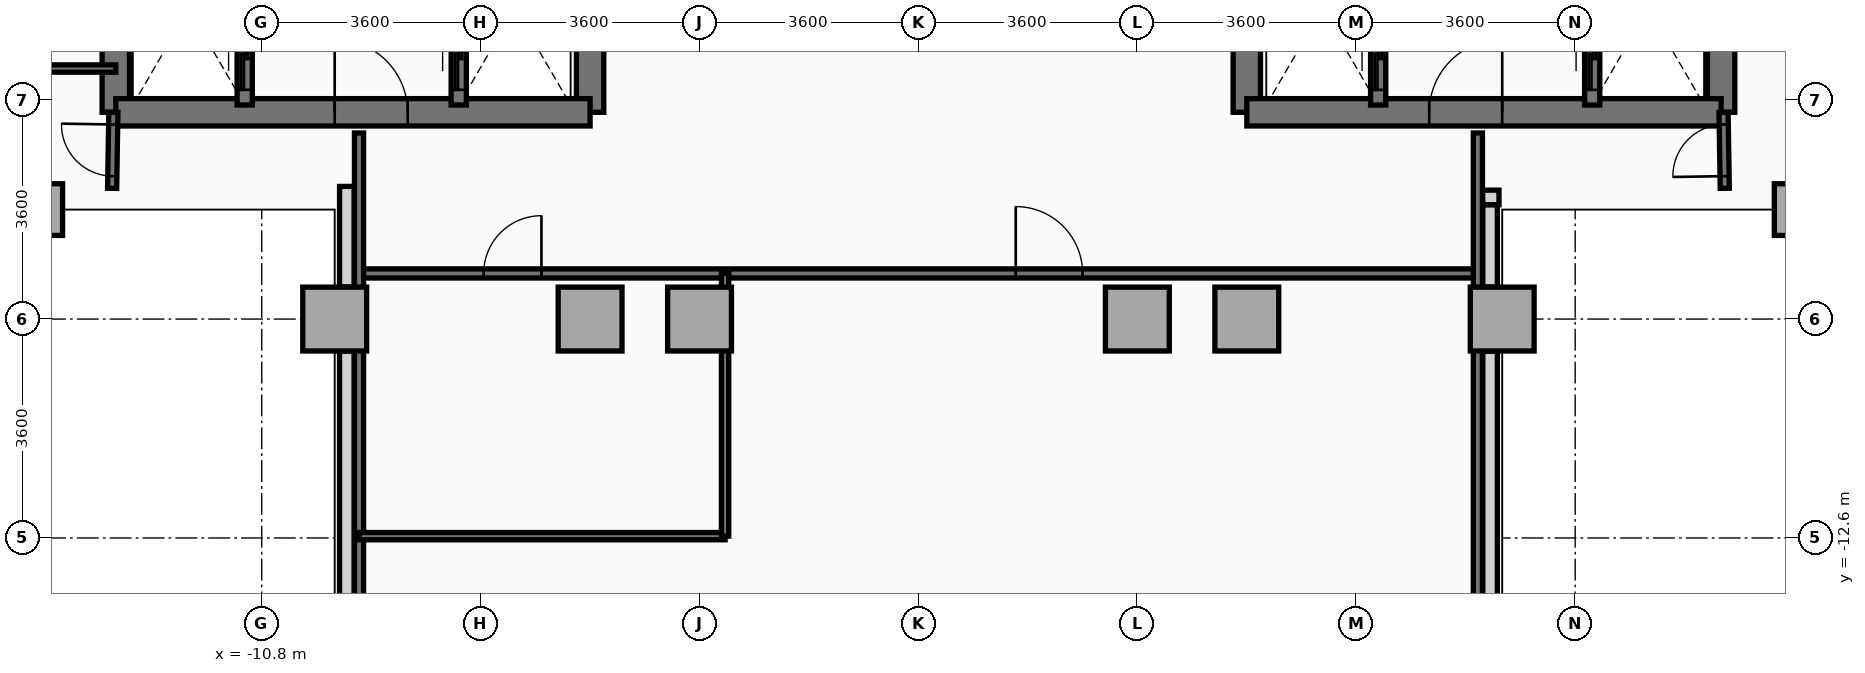
"""IFC4 building model, lengths in metres.
Left out: names, types, materials, properties, quantities, classifications, styles, units other than length and angle.
Written with IfcOpenShell. Run it as: python <this file> out.ifc"""

import sys

from ifc_helpers import new_model, si_unit, direction, frame, frame_2d, origin, origin_2d, place, context, subcontext, project, spatial, rectangle, extrude, source, transform, mapped, element, fill, save


model = new_model("IFC4")
c1 = context("Model", 3, precision=1e-05, world=origin(), true_north=direction((0.0, 1.0)))
c2 = subcontext(c1, "Body", "Model", "MODEL_VIEW")
j1 = project(units=[si_unit("LENGTHUNIT", "METRE"), si_unit("PLANEANGLEUNIT", "RADIAN")], contexts=[c1])
p1 = place(None, origin())
s1 = spatial("IfcSite", under=j1, at=p1, CompositionType="ELEMENT")
p2 = place(p1, origin())
s2 = spatial("IfcBuilding", under=s1, at=p2, CompositionType="ELEMENT")
p3 = place(p2, frame((0.0, 0.0, 93.0)))
s3 = spatial("IfcBuildingStorey", under=s2, at=p3, CompositionType="ELEMENT", Elevation=93.0)
m1 = source(origin(), c2, "Body", "SweptSolid", [
    extrude(rectangle(XDim=0.65, YDim=0.85, at=origin_2d()), origin(), (0.0, 0.0, 1.0), 4.0),
])
p4 = place(p3, frame((-14.4, -7.2, 0.0), z_axis=(0.0, 0.0, 1.0), x_axis=(1.0, 0.0, 0.0)))
e1 = element("IfcColumn", 1, at=p4, inside=s3, PredefinedType="COLUMN", context=c2, shape_type="MappedRepresentation", body=[
    mapped(m1, transform((0.0, 0.0, 0.0), x_axis=(1.0, 0.0, 0.0), y_axis=(0.0, 1.0, 0.0), z_axis=(0.0, 0.0, 1.0), scale=1.0)),
])
m2 = source(origin(), c2, "Body", "SweptSolid", [
    extrude(rectangle(XDim=1.05, YDim=1.05, at=origin_2d()), origin(), (0.0, 0.0, 1.0), 4.0),
])
for number, where, z_axis, x_axis in (
    (2, (-9.6, -9.0, 0.0), (0.0, 0.0, 1.0), (1.0, 0.0, 0.0)),
    (3, (-5.4, -9.0, 0.0), (0.0, 0.0, 1.0), (1.0, 0.0, 0.0)),
    (4, (-3.6, -9.0, 0.0), (0.0, 0.0, 1.0), (1.0, 0.0, 0.0)),
    (5, (3.6, -9.0, 0.0), (0.0, 0.0, 1.0), (1.0, 0.0, 0.0)),
    (6, (5.4, -9.0, 0.0), (0.0, 0.0, 1.0), (1.0, 0.0, 0.0)),
    (7, (9.6, -9.0, 0.0), (0.0, 0.0, 1.0), (1.0, 0.0, 0.0)),
):
    element("IfcColumn", number, at=place(p3, frame(where, z_axis=z_axis, x_axis=x_axis)), inside=s3, PredefinedType="COLUMN", context=c2, shape_type="MappedRepresentation", body=[
        mapped(m2, transform((0.0, 0.0, 0.0), x_axis=(1.0, 0.0, 0.0), y_axis=(0.0, 1.0, 0.0), z_axis=(0.0, 0.0, 1.0), scale=1.0)),
    ])
p5 = place(p3, frame((14.4, -7.2, 0.0), z_axis=(0.0, 0.0, 1.0), x_axis=(1.0, 0.0, 0.0)))
e8 = element("IfcColumn", 8, at=p5, inside=s3, PredefinedType="COLUMN", context=c2, shape_type="MappedRepresentation", body=[
    mapped(m1, transform((0.0, 0.0, 0.0), x_axis=(1.0, 0.0, 0.0), y_axis=(0.0, 1.0, 0.0), z_axis=(0.0, 0.0, 1.0), scale=1.0)),
])
p6 = place(p3, frame((9.547, -7.0, 0.0), z_axis=(0.0, 0.0, 1.0), x_axis=(-1.0, 0.0, 0.0)))
e9 = element("IfcWall", 9, at=p6, inside=s3, PredefinedType="PARAPET", context=c2, shape_type="SweptSolid", body=[
    extrude(rectangle(XDim=0.269, YDim=0.24, at=frame_2d((0.135, 0.0))), origin(), (0.0, 0.0, 1.0), 1.15),
])
p7 = place(p3, frame((9.4, -7.123, 0.0), z_axis=(0.0, 0.0, 1.0), x_axis=(0.0, -1.0, 0.0)))
e10 = element("IfcWall", 10, at=p7, inside=s3, PredefinedType="PARAPET", context=c2, shape_type="SweptSolid", body=[
    extrude(rectangle(XDim=1.349, YDim=0.24, at=frame_2d((0.674, 0.0))), origin(), (0.0, 0.0, 1.0), 1.15),
])
p8 = place(p3, frame((9.4, -9.528, 0.0), z_axis=(0.0, 0.0, 1.0), x_axis=(0.0, -1.0, 0.0)))
e11 = element("IfcWall", 11, at=p8, inside=s3, PredefinedType="PARAPET", context=c2, shape_type="SweptSolid", body=[
    extrude(rectangle(XDim=6.075, YDim=0.24, at=frame_2d((3.037, 0.0))), origin(), (0.0, 0.0, 1.0), 1.15),
])
p9 = place(p3, frame((-9.4, -15.358, 0.0), z_axis=(0.0, 0.0, 1.0), x_axis=(0.0, 1.0, 0.0)))
e12 = element("IfcWall", 12, at=p9, inside=s3, PredefinedType="PARAPET", context=c2, shape_type="SweptSolid", body=[
    extrude(rectangle(XDim=5.83, YDim=0.24, at=frame_2d((2.915, 0.0))), origin(), (0.0, 0.0, 1.0), 1.15),
])
p10 = place(p3, frame((-9.4, -8.472, 0.0), z_axis=(0.0, 0.0, 1.0), x_axis=(0.0, 1.0, 0.0)))
e13 = element("IfcWall", 13, at=p10, inside=s3, PredefinedType="PARAPET", context=c2, shape_type="SweptSolid", body=[
    extrude(rectangle(XDim=1.653, YDim=0.24, at=frame_2d((0.827, 0.0))), origin(), (0.0, 0.0, 1.0), 1.15),
])
p11 = place(p3, frame((-13.2, -5.6, 0.0), z_axis=(0.0, 0.0, 1.0), x_axis=(0.0, 1.0, 0.0)))
e14 = element("IfcWall", 14, at=p11, inside=s3, PredefinedType="SHEAR", context=c2, shape_type="SweptSolid", body=[
    extrude(rectangle(XDim=11.2, YDim=0.45, at=frame_2d((5.6, 0.0))), origin(), (0.0, 0.0, 1.0), 4.0),
])
p12 = place(p3, frame((-5.4, -5.6, 0.0), z_axis=(0.0, 0.0, 1.0), x_axis=(0.0, 1.0, 0.0)))
e15 = element("IfcWall", 15, at=p12, inside=s3, PredefinedType="SHEAR", context=c2, shape_type="SweptSolid", body=[
    extrude(rectangle(XDim=12.5, YDim=0.45, at=frame_2d((6.25, 0.0))), origin(), (0.0, 0.0, 1.0), 4.0),
])
p13 = place(p12, frame((4.55, 0.0, 0.0)))
e16 = element("IfcOpeningElement", 16, at=p13, cuts=e15, PredefinedType="OPENING", context=c2, shape_type="SweptSolid", body=[
    extrude(rectangle(XDim=1.2, YDim=2.2, at=frame_2d((0.6, 1.1))), frame((0.0, 0.235, 0.0), z_axis=(0.0, -1.0, 0.0), x_axis=(1.0, 0.0, 0.0)), (0.0, 0.0, 1.0), 0.47),
])
p14 = place(p12, frame((10.45, 0.0, 0.0)))
e17 = element("IfcOpeningElement", 17, at=p14, cuts=e15, PredefinedType="OPENING", context=c2, shape_type="SweptSolid", body=[
    extrude(rectangle(XDim=1.2, YDim=2.2, at=frame_2d((0.6, 1.1))), frame((0.0, 0.235, 0.0), z_axis=(0.0, -1.0, 0.0), x_axis=(1.0, 0.0, 0.0)), (0.0, 0.0, 1.0), 0.47),
])
p15 = place(p12, frame((6.86, 0.0, 0.0)))
e18 = element("IfcOpeningElement", 18, at=p15, cuts=e15, PredefinedType="OPENING", context=c2, shape_type="SweptSolid", body=[
    extrude(rectangle(XDim=0.8, YDim=2.1, at=frame_2d((0.4, 1.05))), frame((0.0, 0.235, 0.0), z_axis=(0.0, -1.0, 0.0), x_axis=(1.0, 0.0, 0.0)), (0.0, 0.0, 1.0), 0.47),
])
p16 = place(p3, frame((-13.2, -5.6, 0.0), z_axis=(0.0, 0.0, 1.0), x_axis=(1.0, 0.0, 0.0)))
e19 = element("IfcWall", 19, at=p16, inside=s3, PredefinedType="SHEAR", context=c2, shape_type="SweptSolid", body=[
    extrude(rectangle(XDim=7.8, YDim=0.45, at=frame_2d((3.9, 0.0))), origin(), (0.0, 0.0, 1.0), 4.0),
])
p17 = place(p16, frame((3.6, 0.0, 0.0)))
e20 = element("IfcOpeningElement", 20, at=p17, cuts=e19, PredefinedType="OPENING", context=c2, shape_type="SweptSolid", body=[
    extrude(rectangle(XDim=1.2, YDim=2.2, at=frame_2d((0.6, 1.1))), frame((0.0, 0.235, 0.0), z_axis=(0.0, -1.0, 0.0), x_axis=(1.0, 0.0, 0.0)), (0.0, 0.0, 1.0), 0.47),
])
p18 = place(p3, frame((13.2, -5.6, 0.0), z_axis=(0.0, 0.0, 1.0), x_axis=(0.0, 1.0, 0.0)))
e21 = element("IfcWall", 21, at=p18, inside=s3, PredefinedType="SHEAR", context=c2, shape_type="SweptSolid", body=[
    extrude(rectangle(XDim=11.2, YDim=0.45, at=frame_2d((5.6, 0.0))), origin(), (0.0, 0.0, 1.0), 4.0),
])
p19 = place(p3, frame((5.4, -5.6, 0.0), z_axis=(0.0, 0.0, 1.0), x_axis=(0.0, 1.0, 0.0)))
e22 = element("IfcWall", 22, at=p19, inside=s3, PredefinedType="SHEAR", context=c2, shape_type="SweptSolid", body=[
    extrude(rectangle(XDim=12.5, YDim=0.45, at=frame_2d((6.25, 0.0))), origin(), (0.0, 0.0, 1.0), 4.0),
])
p20 = place(p19, frame((4.55, 0.0, 0.0)))
e23 = element("IfcOpeningElement", 23, at=p20, cuts=e22, PredefinedType="OPENING", context=c2, shape_type="SweptSolid", body=[
    extrude(rectangle(XDim=1.2, YDim=2.2, at=frame_2d((0.6, 1.1))), frame((0.0, 0.235, 0.0), z_axis=(0.0, -1.0, 0.0), x_axis=(1.0, 0.0, 0.0)), (0.0, 0.0, 1.0), 0.47),
])
p21 = place(p19, frame((10.45, 0.0, 0.0)))
e24 = element("IfcOpeningElement", 24, at=p21, cuts=e22, PredefinedType="OPENING", context=c2, shape_type="SweptSolid", body=[
    extrude(rectangle(XDim=1.2, YDim=2.2, at=frame_2d((0.6, 1.1))), frame((0.0, 0.235, 0.0), z_axis=(0.0, -1.0, 0.0), x_axis=(1.0, 0.0, 0.0)), (0.0, 0.0, 1.0), 0.47),
])
p22 = place(p19, frame((6.86, 0.0, 0.0)))
e25 = element("IfcOpeningElement", 25, at=p22, cuts=e22, PredefinedType="OPENING", context=c2, shape_type="SweptSolid", body=[
    extrude(rectangle(XDim=0.8, YDim=2.1, at=frame_2d((0.4, 1.05))), frame((0.0, 0.235, 0.0), z_axis=(0.0, -1.0, 0.0), x_axis=(1.0, 0.0, 0.0)), (0.0, 0.0, 1.0), 0.47),
])
p23 = place(p19, frame((7.88, 0.0, 0.0)))
e26 = element("IfcOpeningElement", 26, at=p23, cuts=e22, PredefinedType="OPENING", context=c2, shape_type="SweptSolid", body=[
    extrude(rectangle(XDim=0.8, YDim=2.1, at=frame_2d((0.4, 1.05))), frame((0.0, 0.235, 0.0), z_axis=(0.0, -1.0, 0.0), x_axis=(1.0, 0.0, 0.0)), (0.0, 0.0, 1.0), 0.47),
])
p24 = place(p3, frame((5.4, -5.6, 0.0), z_axis=(0.0, 0.0, 1.0), x_axis=(1.0, 0.0, 0.0)))
e27 = element("IfcWall", 27, at=p24, inside=s3, PredefinedType="SHEAR", context=c2, shape_type="SweptSolid", body=[
    extrude(rectangle(XDim=7.8, YDim=0.45, at=frame_2d((3.9, 0.0))), origin(), (0.0, 0.0, 1.0), 4.0),
])
p25 = place(p24, frame((3.0, 0.0, 0.0)))
e28 = element("IfcOpeningElement", 28, at=p25, cuts=e27, PredefinedType="OPENING", context=c2, shape_type="SweptSolid", body=[
    extrude(rectangle(XDim=1.2, YDim=2.2, at=frame_2d((0.6, 1.1))), frame((0.0, 0.235, 0.0), z_axis=(0.0, -1.0, 0.0), x_axis=(1.0, 0.0, 0.0)), (0.0, 0.0, 1.0), 0.47),
])
p26 = place(p3, frame((-11.08, -5.48, 0.0), z_axis=(0.0, 0.0, 1.0), x_axis=(0.0, 1.0, 0.0)))
e29 = element("IfcWall", 29, at=p26, inside=s3, PredefinedType="SOLIDWALL", context=c2, shape_type="SweptSolid", body=[
    extrude(rectangle(XDim=1.6, YDim=0.25, at=frame_2d((0.8, 0.0))), origin(), (0.0, 0.0, 1.0), 4.0),
])
p27 = place(p26, frame((0.25, 0.0, 0.0)))
e30 = element("IfcOpeningElement", 30, at=p27, cuts=e29, PredefinedType="OPENING", context=c2, shape_type="SweptSolid", body=[
    extrude(rectangle(XDim=1.1, YDim=2.2, at=frame_2d((0.55, 1.1))), frame((0.0, 0.135, 0.0), z_axis=(0.0, -1.0, 0.0), x_axis=(1.0, 0.0, 0.0)), (0.0, 0.0, 1.0), 0.27),
])
p28 = place(p3, frame((11.08, -5.48, 0.0), z_axis=(0.0, 0.0, 1.0), x_axis=(0.0, 1.0, 0.0)))
e31 = element("IfcWall", 31, at=p28, inside=s3, PredefinedType="SOLIDWALL", context=c2, shape_type="SweptSolid", body=[
    extrude(rectangle(XDim=1.6, YDim=0.25, at=frame_2d((0.8, 0.0))), origin(), (0.0, 0.0, 1.0), 4.0),
])
p29 = place(p28, frame((0.25, 0.0, 0.0)))
e32 = element("IfcOpeningElement", 32, at=p29, cuts=e31, PredefinedType="OPENING", context=c2, shape_type="SweptSolid", body=[
    extrude(rectangle(XDim=1.1, YDim=2.2, at=frame_2d((0.55, 1.1))), frame((0.0, 0.135, 0.0), z_axis=(0.0, -1.0, 0.0), x_axis=(1.0, 0.0, 0.0)), (0.0, 0.0, 1.0), 0.27),
])
p30 = place(p3, frame((-7.56, -5.48, 0.0), z_axis=(0.0, 0.0, 1.0), x_axis=(0.0, 1.0, 0.0)))
e33 = element("IfcWall", 33, at=p30, inside=s3, PredefinedType="SOLIDWALL", context=c2, shape_type="SweptSolid", body=[
    extrude(rectangle(XDim=1.6, YDim=0.25, at=frame_2d((0.8, 0.0))), origin(), (0.0, 0.0, 1.0), 4.0),
])
p31 = place(p30, frame((0.25, 0.0, 0.0)))
e34 = element("IfcOpeningElement", 34, at=p31, cuts=e33, PredefinedType="OPENING", context=c2, shape_type="SweptSolid", body=[
    extrude(rectangle(XDim=1.1, YDim=2.2, at=frame_2d((0.55, 1.1))), frame((0.0, 0.135, 0.0), z_axis=(0.0, -1.0, 0.0), x_axis=(1.0, 0.0, 0.0)), (0.0, 0.0, 1.0), 0.27),
])
p32 = place(p3, frame((7.56, -5.48, 0.0), z_axis=(0.0, 0.0, 1.0), x_axis=(0.0, 1.0, 0.0)))
e35 = element("IfcWall", 35, at=p32, inside=s3, PredefinedType="SOLIDWALL", context=c2, shape_type="SweptSolid", body=[
    extrude(rectangle(XDim=1.6, YDim=0.25, at=frame_2d((0.8, 0.0))), origin(), (0.0, 0.0, 1.0), 4.0),
])
p33 = place(p32, frame((0.25, 0.0, 0.0)))
e36 = element("IfcOpeningElement", 36, at=p33, cuts=e35, PredefinedType="OPENING", context=c2, shape_type="SweptSolid", body=[
    extrude(rectangle(XDim=1.1, YDim=2.2, at=frame_2d((0.55, 1.1))), frame((0.0, 0.135, 0.0), z_axis=(0.0, -1.0, 0.0), x_axis=(1.0, 0.0, 0.0)), (0.0, 0.0, 1.0), 0.27),
])
p34 = place(p3, frame((-9.2, -8.25, 0.0), z_axis=(0.0, 0.0, 1.0), x_axis=(1.0, 0.0, 0.0)))
e37 = element("IfcWall", 37, at=p34, inside=s3, PredefinedType="PARTITIONING", context=c2, shape_type="SweptSolid", body=[
    extrude(rectangle(XDim=18.4, YDim=0.15, at=frame_2d((9.2, 0.0))), origin(), (0.0, 0.0, 1.0), 3.55),
])
p35 = place(p34, frame((2.05, 0.0, 0.0)))
e38 = element("IfcOpeningElement", 38, at=p35, cuts=e37, PredefinedType="OPENING", context=c2, shape_type="SweptSolid", body=[
    extrude(rectangle(XDim=0.95, YDim=2.15, at=frame_2d((0.475, 1.075))), frame((0.0, 0.085, 0.0), z_axis=(0.0, -1.0, 0.0), x_axis=(1.0, 0.0, 0.0)), (0.0, 0.0, 1.0), 0.17),
])
p36 = place(p34, frame((10.8, 0.0, 0.0)))
e39 = element("IfcOpeningElement", 39, at=p36, cuts=e37, PredefinedType="OPENING", context=c2, shape_type="SweptSolid", body=[
    extrude(rectangle(XDim=1.1, YDim=2.2, at=frame_2d((0.55, 1.1))), frame((0.0, 0.085, 0.0), z_axis=(0.0, -1.0, 0.0), x_axis=(1.0, 0.0, 0.0)), (0.0, 0.0, 1.0), 0.17),
])
for number, where, z_axis, x_axis in (
    (40, (-9.2, -15.68, 0.0), (0.0, 0.0, 1.0), (0.0, 1.0, 0.0)),
    (41, (9.2, -15.68, 0.0), (0.0, 0.0, 1.0), (0.0, 1.0, 0.0)),
):
    element("IfcWall", number, at=place(p3, frame(where, z_axis=z_axis, x_axis=x_axis)), inside=s3, PredefinedType="PARTITIONING", context=c2, shape_type="SweptSolid", body=[
        extrude(rectangle(XDim=9.74, YDim=0.15, at=frame_2d((4.87, 0.0))), origin(), (0.0, 0.0, 1.0), 3.5),
    ])
p37 = place(p3, frame((-9.2, -12.57, 0.0), z_axis=(0.0, 0.0, 1.0), x_axis=(1.0, 0.0, 0.0)))
e42 = element("IfcWall", 42, at=p37, inside=s3, PredefinedType="PARTITIONING", context=c2, shape_type="SweptSolid", body=[
    extrude(rectangle(XDim=6.02, YDim=0.12, at=frame_2d((3.01, 0.0))), origin(), (0.0, 0.0, 1.0), 4.0),
])
p38 = place(p3, frame((-3.18, -12.57, 0.0), z_axis=(0.0, 0.0, 1.0), x_axis=(0.0, 1.0, 0.0)))
e43 = element("IfcWall", 43, at=p38, inside=s3, PredefinedType="PARTITIONING", context=c2, shape_type="SweptSolid", body=[
    extrude(rectangle(XDim=4.32, YDim=0.12, at=frame_2d((2.16, 0.0))), origin(), (0.0, 0.0, 1.0), 3.5),
])
p39 = place(p3, frame((-13.26, -6.85, 0.0), z_axis=(0.0, 0.0, 1.0), x_axis=(0.016013571389, 0.999871774545, 0.0)))
e44 = element("IfcWall", 44, at=p39, inside=s3, PredefinedType="PARTITIONING", context=c2, shape_type="SweptSolid", body=[
    extrude(rectangle(XDim=1.25, YDim=0.15, at=frame_2d((0.625, 0.0))), origin(), (0.0, 0.0, 1.0), 4.0),
])
p40 = place(p39, frame((0.2, 0.0, 0.0)))
e45 = element("IfcOpeningElement", 45, at=p40, cuts=e44, PredefinedType="OPENING", context=c2, shape_type="SweptSolid", body=[
    extrude(rectangle(XDim=0.85, YDim=2.1, at=frame_2d((0.425, 1.05))), frame((0.0, 0.085, 0.0), z_axis=(0.0, -1.0, 0.0), x_axis=(1.0, 0.0, 0.0)), (0.0, 0.0, 1.0), 0.17),
])
p41 = place(p3, frame((-19.17, -4.88, 0.0), z_axis=(0.0, 0.0, 1.0), x_axis=(1.0, 0.0, 0.0)))
e46 = element("IfcWall", 46, at=p41, inside=s3, PredefinedType="PARTITIONING", context=c2, shape_type="SweptSolid", body=[
    extrude(rectangle(XDim=5.97, YDim=0.12, at=frame_2d((2.985, 0.0))), origin(), (0.0, 0.0, 1.0), 3.55),
])
p42 = place(p41, frame((1.45, 0.0, 0.0)))
e47 = element("IfcOpeningElement", 47, at=p42, cuts=e46, PredefinedType="OPENING", context=c2, shape_type="SweptSolid", body=[
    extrude(rectangle(XDim=0.95, YDim=2.15, at=frame_2d((0.475, 1.075))), frame((0.0, 0.07, 0.0), z_axis=(0.0, -1.0, 0.0), x_axis=(1.0, 0.0, 0.0)), (0.0, 0.0, 1.0), 0.14),
])
p43 = place(p3, frame((13.26, -6.85, 0.0), z_axis=(0.0, 0.0, 1.0), x_axis=(-0.016013571389, 0.999871774545, 0.0)))
e48 = element("IfcWall", 48, at=p43, inside=s3, PredefinedType="PARTITIONING", context=c2, shape_type="SweptSolid", body=[
    extrude(rectangle(XDim=1.25, YDim=0.15, at=frame_2d((0.625, 0.0))), origin(), (0.0, 0.0, 1.0), 4.0),
])
p44 = place(p43, frame((0.2, 0.0, 0.0)))
e49 = element("IfcOpeningElement", 49, at=p44, cuts=e48, PredefinedType="OPENING", context=c2, shape_type="SweptSolid", body=[
    extrude(rectangle(XDim=0.85, YDim=2.1, at=frame_2d((0.425, 1.05))), frame((0.0, 0.085, 0.0), z_axis=(0.0, -1.0, 0.0), x_axis=(1.0, 0.0, 0.0)), (0.0, 0.0, 1.0), 0.17),
])
m3 = source(origin(), c2, "Body", "SweptSolid", [
    extrude(rectangle(XDim=1.2, YDim=2.2, at=frame_2d((0.6, 1.1))), frame((0.0, 0.025, 0.0), z_axis=(0.0, -1.0, 0.0), x_axis=(1.0, 0.0, 0.0)), (0.0, 0.0, 1.0), 0.05),
])
p45 = place(p17, origin())
e50 = element("IfcDoor", 50, at=p45, inside=s3, OperationType="SINGLE_SWING_LEFT", PredefinedType="DOOR", context=c2, shape_type="MappedRepresentation", body=[
    mapped(m3, transform((0.0, 0.0, 0.0), x_axis=(1.0, 0.0, 0.0), y_axis=(0.0, 1.0, 0.0), z_axis=(0.0, 0.0, 1.0), scale=1.0)),
])
fill(e20, e50)
p46 = place(p25, origin())
e51 = element("IfcDoor", 51, at=p46, inside=s3, OperationType="SINGLE_SWING_RIGHT", PredefinedType="DOOR", context=c2, shape_type="MappedRepresentation", body=[
    mapped(m3, transform((0.0, 0.0, 0.0), x_axis=(1.0, 0.0, 0.0), y_axis=(0.0, 1.0, 0.0), z_axis=(0.0, 0.0, 1.0), scale=1.0)),
])
fill(e28, e51)
m4 = source(origin(), c2, "Body", "SweptSolid", [
    extrude(rectangle(XDim=1.1, YDim=2.2, at=frame_2d((0.55, 1.1))), frame((0.0, 0.025, 0.0), z_axis=(0.0, -1.0, 0.0), x_axis=(1.0, 0.0, 0.0)), (0.0, 0.0, 1.0), 0.05),
])
p47 = place(p27, origin())
e52 = element("IfcDoor", 52, at=p47, inside=s3, OperationType="SLIDING_TO_LEFT", PredefinedType="DOOR", context=c2, shape_type="MappedRepresentation", body=[
    mapped(m4, transform((0.0, 0.0, 0.0), x_axis=(1.0, 0.0, 0.0), y_axis=(0.0, 1.0, 0.0), z_axis=(0.0, 0.0, 1.0), scale=1.0)),
])
fill(e30, e52)
p48 = place(p29, origin())
e53 = element("IfcDoor", 53, at=p48, inside=s3, OperationType="SLIDING_TO_LEFT", PredefinedType="DOOR", context=c2, shape_type="MappedRepresentation", body=[
    mapped(m4, transform((0.0, 0.0, 0.0), x_axis=(1.0, 0.0, 0.0), y_axis=(0.0, 1.0, 0.0), z_axis=(0.0, 0.0, 1.0), scale=1.0)),
])
fill(e32, e53)
p49 = place(p31, origin())
e54 = element("IfcDoor", 54, at=p49, inside=s3, OperationType="SLIDING_TO_LEFT", PredefinedType="DOOR", context=c2, shape_type="MappedRepresentation", body=[
    mapped(m4, transform((0.0, 0.0, 0.0), x_axis=(1.0, 0.0, 0.0), y_axis=(0.0, 1.0, 0.0), z_axis=(0.0, 0.0, 1.0), scale=1.0)),
])
fill(e34, e54)
p50 = place(p33, origin())
e55 = element("IfcDoor", 55, at=p50, inside=s3, OperationType="SLIDING_TO_LEFT", PredefinedType="DOOR", context=c2, shape_type="MappedRepresentation", body=[
    mapped(m4, transform((0.0, 0.0, 0.0), x_axis=(1.0, 0.0, 0.0), y_axis=(0.0, 1.0, 0.0), z_axis=(0.0, 0.0, 1.0), scale=1.0)),
])
fill(e36, e55)
m5 = source(origin(), c2, "Body", "SweptSolid", [
    extrude(rectangle(XDim=0.95, YDim=2.15, at=frame_2d((0.475, 1.075))), frame((0.0, 0.025, 0.0), z_axis=(0.0, -1.0, 0.0), x_axis=(1.0, 0.0, 0.0)), (0.0, 0.0, 1.0), 0.05),
])
p51 = place(p35, origin())
e56 = element("IfcDoor", 56, at=p51, inside=s3, OperationType="SINGLE_SWING_RIGHT", PredefinedType="DOOR", context=c2, shape_type="MappedRepresentation", body=[
    mapped(m5, transform((0.0, 0.0, 0.0), x_axis=(1.0, 0.0, 0.0), y_axis=(0.0, 1.0, 0.0), z_axis=(0.0, 0.0, 1.0), scale=1.0)),
])
fill(e38, e56)
p52 = place(p36, origin())
e57 = element("IfcDoor", 57, at=p52, inside=s3, OperationType="SINGLE_SWING_LEFT", PredefinedType="DOOR", context=c2, shape_type="MappedRepresentation", body=[
    mapped(m4, transform((0.0, 0.0, 0.0), x_axis=(1.0, 0.0, 0.0), y_axis=(0.0, 1.0, 0.0), z_axis=(0.0, 0.0, 1.0), scale=1.0)),
])
fill(e39, e57)
m6 = source(origin(), c2, "Body", "SweptSolid", [
    extrude(rectangle(XDim=0.85, YDim=2.1, at=frame_2d((0.425, 1.05))), frame((0.0, 0.025, 0.0), z_axis=(0.0, -1.0, 0.0), x_axis=(1.0, 0.0, 0.0)), (0.0, 0.0, 1.0), 0.05),
])
p53 = place(p40, origin())
e58 = element("IfcDoor", 58, at=p53, inside=s3, OperationType="SINGLE_SWING_RIGHT", PredefinedType="DOOR", context=c2, shape_type="MappedRepresentation", body=[
    mapped(m6, transform((0.0, 0.0, 0.0), x_axis=(1.0, 0.0, 0.0), y_axis=(0.0, 1.0, 0.0), z_axis=(0.0, 0.0, 1.0), scale=1.0)),
])
fill(e45, e58)
p54 = place(p44, origin())
e59 = element("IfcDoor", 59, at=p54, inside=s3, OperationType="SINGLE_SWING_LEFT", PredefinedType="DOOR", context=c2, shape_type="MappedRepresentation", body=[
    mapped(m6, transform((0.0, 0.0, 0.0), x_axis=(1.0, 0.0, 0.0), y_axis=(0.0, 1.0, 0.0), z_axis=(0.0, 0.0, 1.0), scale=1.0)),
])
fill(e49, e59)
save(model, sys.argv[1])
